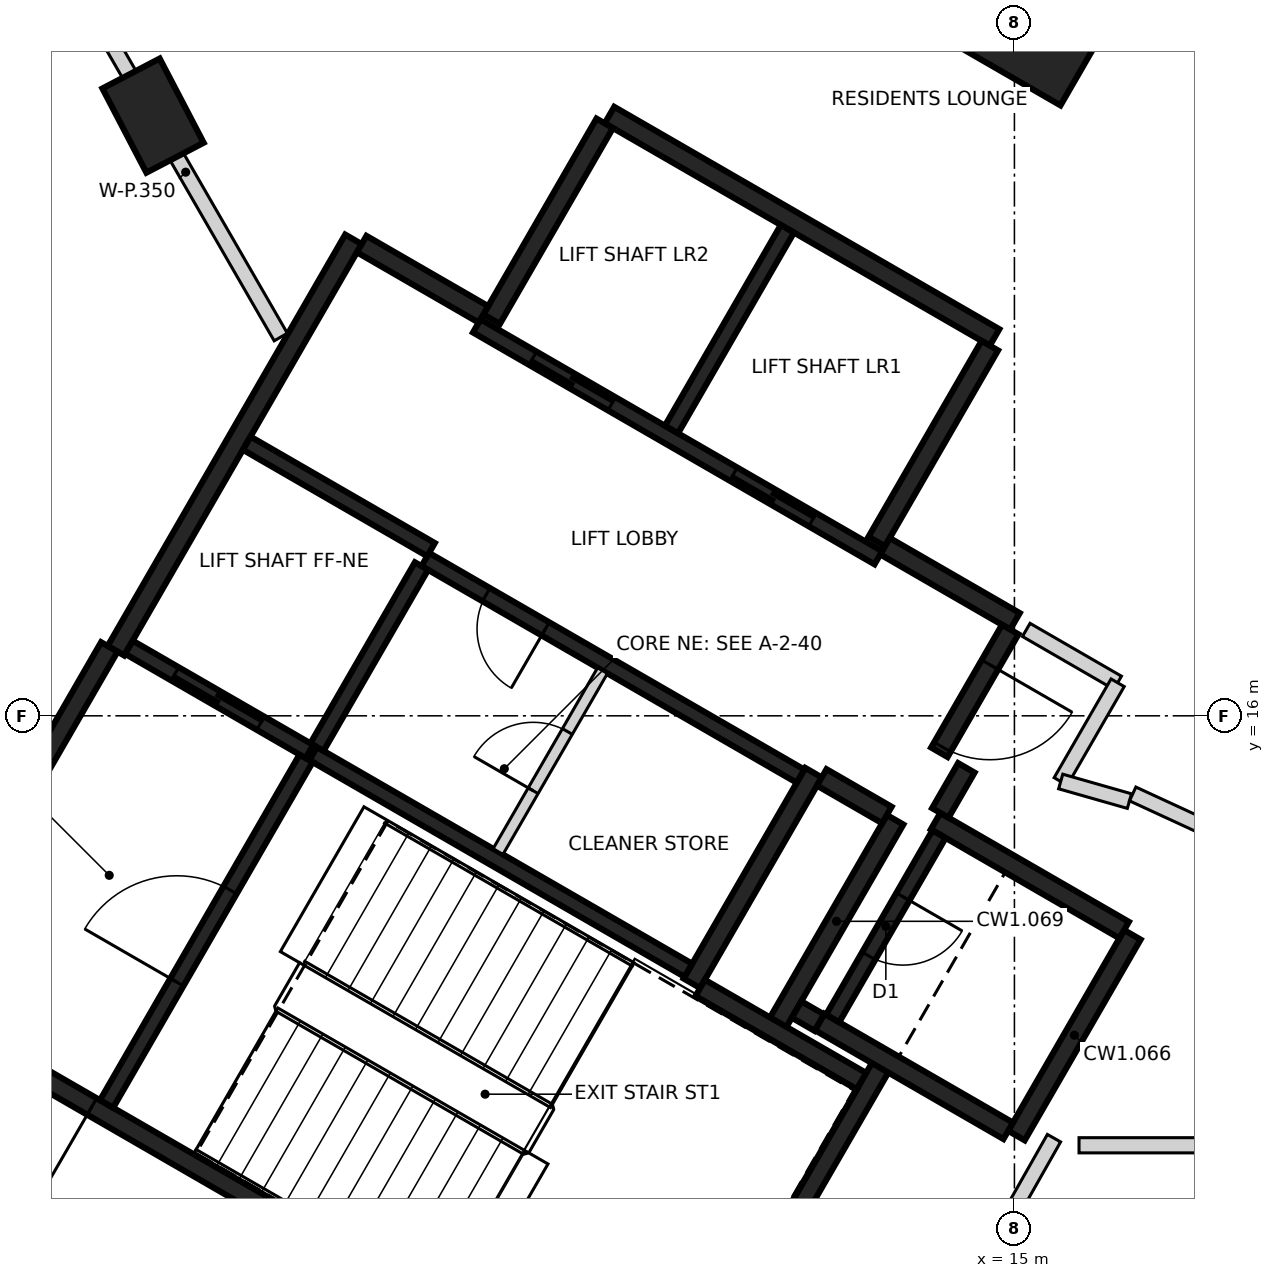
"""IFC4 building model, lengths in metres.
Left out: names, types, materials, properties, quantities, classifications, styles, units other than length and angle.
Written with IfcOpenShell. Run it as: python <this file> out.ifc"""

import sys

from ifc_helpers import new_model, si_unit, direction, frame, frame_2d, origin, origin_2d, place, context, subcontext, project, spatial, rectangle, extrude, element, fill, save


model = new_model("IFC4")
c1 = context("Model", 3, precision=1e-05, world=origin(), true_north=direction((0.0, 1.0)))
c2 = subcontext(c1, "Body", "Model", "MODEL_VIEW")
j1 = project(units=[si_unit("LENGTHUNIT", "METRE"), si_unit("PLANEANGLEUNIT", "RADIAN")], contexts=[c1])
p1 = place(None, origin())
s1 = spatial("IfcSite", under=j1, at=p1, CompositionType="ELEMENT")
p2 = place(p1, origin())
s2 = spatial("IfcBuilding", under=s1, at=p2, CompositionType="ELEMENT")
p3 = place(p2, frame((0.0, 0.0, 132.4)))
s3 = spatial("IfcBuildingStorey", under=s2, at=p3, CompositionType="ELEMENT", Elevation=132.4)
p4 = place(p3, frame((3.667, 23.896, -0.4), z_axis=(0.0, 0.0, 1.0), x_axis=(-0.463006774365, 0.886354740999, 0.0)))
e1 = element("IfcColumn", 1, at=p4, inside=s3, PredefinedType="COLUMN", context=c2, shape_type="SweptSolid", body=[
    extrude(rectangle(XDim=1.25, YDim=0.85, at=origin_2d()), origin(), (0.0, 0.0, 1.0), 3.6),
])
p5 = place(p3, frame((15.207, 26.34, -0.4), z_axis=(0.0, 0.0, 1.0), x_axis=(0.5, 0.866025403784, 0.0)))
e2 = element("IfcColumn", 2, at=p5, inside=s3, PredefinedType="COLUMN", context=c2, shape_type="SweptSolid", body=[
    extrude(rectangle(XDim=3.6, YDim=3.0, at=origin_2d()), origin(), (0.0, 0.0, 1.0), 3.6),
])
p6 = place(p3, frame((10.42, 6.498, 0.0), z_axis=(0.0, 0.0, 1.0), x_axis=(-0.866021906294, 0.500006057782, 0.0)))
e3 = element("IfcWall", 3, at=p6, inside=s3, PredefinedType="SHEAR", context=c2, shape_type="SweptSolid", body=[
    extrude(rectangle(XDim=11.55, YDim=0.25, at=frame_2d((5.775, 0.0))), origin(), (0.0, 0.0, 1.0), 3.2),
])
p7 = place(p6, frame((10.025, 0.0, 0.0)))
e4 = element("IfcOpeningElement", 4, at=p7, cuts=e3, PredefinedType="OPENING", context=c2, shape_type="SweptSolid", body=[
    extrude(rectangle(XDim=1.2, YDim=2.1, at=frame_2d((0.6, 1.05))), frame((0.0, 0.135, 0.0), z_axis=(0.0, -1.0, 0.0), x_axis=(1.0, 0.0, 0.0)), (0.0, 0.0, 1.0), 0.27),
])
p8 = place(p6, frame((8.725, 0.0, 0.0)))
e5 = element("IfcOpeningElement", 5, at=p8, cuts=e3, PredefinedType="OPENING", context=c2, shape_type="SweptSolid", body=[
    extrude(rectangle(XDim=1.2, YDim=2.1, at=frame_2d((0.6, 1.05))), frame((0.0, 0.135, 0.0), z_axis=(0.0, -1.0, 0.0), x_axis=(1.0, 0.0, 0.0)), (0.0, 0.0, 1.0), 0.27),
])
p9 = place(p3, frame((3.179, 16.856, 0.0), z_axis=(0.0, 0.0, 1.0), x_axis=(0.500004234368, 0.866022959057, 0.0)))
e6 = element("IfcWall", 6, at=p9, inside=s3, PredefinedType="SHEAR", context=c2, shape_type="SweptSolid", body=[
    extrude(rectangle(XDim=6.25, YDim=0.25, at=frame_2d((3.125, 0.0))), origin(), (0.0, 0.0, 1.0), 3.2),
])
p10 = place(p3, frame((9.673, 23.903, 0.0), z_axis=(0.0, 0.0, 1.0), x_axis=(0.86603616409, -0.499981362141, 0.0)))
e7 = element("IfcWall", 7, at=p10, inside=s3, PredefinedType="SHEAR", context=c2, shape_type="SweptSolid", body=[
    extrude(rectangle(XDim=5.85, YDim=0.25, at=frame_2d((2.925, 0.0))), origin(), (0.0, 0.0, 1.0), 3.2),
])
p11 = place(p3, frame((0.48, 12.381, 0.0), z_axis=(0.0, 0.0, 1.0), x_axis=(0.49999885962, 0.866026062182, 0.0)))
e8 = element("IfcWall", 8, at=p11, inside=s3, PredefinedType="SHEAR", context=c2, shape_type="SweptSolid", body=[
    extrude(rectangle(XDim=5.225, YDim=0.25, at=frame_2d((2.612, 0.0))), origin(), (0.0, 0.0, 1.0), 3.2),
])
p12 = place(p3, frame((13.238, 11.378, 0.0), z_axis=(0.0, 0.0, 1.0), x_axis=(-0.500008851346, -0.866020293397, 0.0)))
e9 = element("IfcWall", 9, at=p12, inside=s3, PredefinedType="SHEAR", context=c2, shape_type="SweptSolid", body=[
    extrude(rectangle(XDim=5.51, YDim=0.25, at=frame_2d((2.755, 0.0))), origin(), (0.0, 0.0, 1.0), 3.2),
])
p13 = place(p3, frame((12.357, 15.252, 0.0), z_axis=(0.0, 0.0, 1.0), x_axis=(-0.500028443584, -0.866008981251, 0.0)))
e10 = element("IfcWall", 10, at=p13, inside=s3, PredefinedType="SHEAR", context=c2, shape_type="SweptSolid", body=[
    extrude(rectangle(XDim=3.2, YDim=0.25, at=frame_2d((1.6, 0.0))), origin(), (0.0, 0.0, 1.0), 3.2),
])
for number, where, z_axis, x_axis in (
    (11, (8.123, 21.219, 0.0), (0.0, 0.0, 1.0), (0.5, 0.866, 0.0)),
    (12, (14.676, 20.87, 0.0), (0.0, 0.0, 1.0), (-0.5, -0.866, 0.0)),
):
    element("IfcWall", number, at=place(p3, frame(where, z_axis=z_axis, x_axis=x_axis)), inside=s3, PredefinedType="SHEAR", context=c2, shape_type="SweptSolid", body=[
        extrude(rectangle(XDim=2.975, YDim=0.25, at=frame_2d((1.487, 0.0))), origin(), (0.0, 0.0, 1.0), 3.2),
    ])
p14 = place(p3, frame((16.552, 13.119, 0.0), z_axis=(0.0, 0.0, 1.0), x_axis=(-0.499978833458, -0.866037623948, 0.0)))
e13 = element("IfcWall", 13, at=p14, inside=s3, PredefinedType="SHEAR", context=c2, shape_type="SweptSolid", body=[
    extrude(rectangle(XDim=3.05, YDim=0.25, at=frame_2d((1.525, 0.0))), origin(), (0.0, 0.0, 1.0), 3.2),
])
p15 = place(p3, frame((14.918, 10.54, 0.0), z_axis=(0.0, 0.0, 1.0), x_axis=(-0.866063538972, 0.499933942099, 0.0)))
e14 = element("IfcWall", 14, at=p15, inside=s3, PredefinedType="SHEAR", context=c2, shape_type="SweptSolid", body=[
    extrude(rectangle(XDim=2.865, YDim=0.25, at=frame_2d((1.432, 0.0))), origin(), (0.0, 0.0, 1.0), 3.2),
])
p16 = place(p3, frame((13.963, 14.614, 0.0), z_axis=(0.0, 0.0, 1.0), x_axis=(0.866042235819, -0.499970844928, 0.0)))
e15 = element("IfcWall", 15, at=p16, inside=s3, PredefinedType="SHEAR", context=c2, shape_type="SweptSolid", body=[
    extrude(rectangle(XDim=2.865, YDim=0.25, at=frame_2d((1.432, 0.0))), origin(), (0.0, 0.0, 1.0), 3.2),
])
p17 = place(p3, frame((11.888, 11.961, 0.0), z_axis=(0.0, 0.0, 1.0), x_axis=(0.500003324108, 0.866023484601, 0.0)))
e16 = element("IfcWall", 16, at=p17, inside=s3, PredefinedType="SHEAR", context=c2, shape_type="SweptSolid", body=[
    extrude(rectangle(XDim=3.085, YDim=0.25, at=frame_2d((1.542, 0.0))), origin(), (0.0, 0.0, 1.0), 3.2),
])
p18 = place(p3, frame((10.865, 12.418, 0.0), z_axis=(0.0, 0.0, 1.0), x_axis=(0.866026229868, -0.499998569178, 0.0)))
e17 = element("IfcWall", 17, at=p18, inside=s3, PredefinedType="SHEAR", context=c2, shape_type="SweptSolid", body=[
    extrude(rectangle(XDim=2.449, YDim=0.25, at=frame_2d((1.225, 0.0))), origin(), (0.0, 0.0, 1.0), 3.2),
])
p19 = place(p3, frame((13.297, 18.231, 0.0), z_axis=(0.0, 0.0, 1.0), x_axis=(0.866043531843, -0.499968599967, 0.0)))
e18 = element("IfcWall", 18, at=p19, inside=s3, PredefinedType="SHEAR", context=c2, shape_type="SweptSolid", body=[
    extrude(rectangle(XDim=1.975, YDim=0.25, at=frame_2d((0.987, 0.0))), origin(), (0.0, 0.0, 1.0), 3.2),
])
p20 = place(p3, frame((6.413, 22.206, 0.0), z_axis=(0.0, 0.0, 1.0), x_axis=(0.866016279763, -0.500015802937, 0.0)))
e19 = element("IfcWall", 19, at=p20, inside=s3, PredefinedType="SHEAR", context=c2, shape_type="SweptSolid", body=[
    extrude(rectangle(XDim=1.849, YDim=0.25, at=frame_2d((0.925, 0.0))), origin(), (0.0, 0.0, 1.0), 3.2),
])
p21 = place(p3, frame((14.945, 17.135, 0.0), z_axis=(0.0, 0.0, 1.0), x_axis=(-0.499983108224, -0.866035156036, 0.0)))
e20 = element("IfcWall", 20, at=p21, inside=s3, PredefinedType="SHEAR", context=c2, shape_type="SweptSolid", body=[
    extrude(rectangle(XDim=1.865, YDim=0.25, at=frame_2d((0.932, 0.0))), origin(), (0.0, 0.0, 1.0), 3.2),
])
p22 = place(p21, frame((0.535, 0.0, 0.0)))
e21 = element("IfcOpeningElement", 21, at=p22, cuts=e20, PredefinedType="OPENING", context=c2, shape_type="SweptSolid", body=[
    extrude(rectangle(XDim=1.25, YDim=2.1, at=frame_2d((0.625, 1.05))), frame((0.0, 0.135, 0.0), z_axis=(0.0, -1.0, 0.0), x_axis=(1.0, 0.0, 0.0)), (0.0, 0.0, 1.0), 0.27),
])
p23 = place(p3, frame((13.322, 14.695, 0.0), z_axis=(0.0, 0.0, 1.0), x_axis=(-0.866017078145, 0.500014420154, 0.0)))
e22 = element("IfcWall", 22, at=p23, inside=s3, PredefinedType="SHEAR", context=c2, shape_type="SweptSolid", body=[
    extrude(rectangle(XDim=0.989, YDim=0.25, at=frame_2d((0.495, 0.0))), origin(), (0.0, 0.0, 1.0), 3.2),
])
p24 = place(p3, frame((14.368, 15.315, 0.0), z_axis=(0.0, 0.0, 1.0), x_axis=(-0.499897359611, -0.866084655132, 0.0)))
e23 = element("IfcWall", 23, at=p24, inside=s3, PredefinedType="SHEAR", context=c2, shape_type="SweptSolid", body=[
    extrude(rectangle(XDim=0.685, YDim=0.25, at=frame_2d((0.342, 0.0))), origin(), (0.0, 0.0, 1.0), 3.2),
])
p25 = place(p3, frame((12.433, 11.964, 0.0), z_axis=(0.0, 0.0, 1.0), x_axis=(-0.866055875208, 0.499947218231, 0.0)))
e24 = element("IfcWall", 24, at=p25, inside=s3, PredefinedType="SHEAR", context=c2, shape_type="SweptSolid", body=[
    extrude(rectangle(XDim=0.345, YDim=0.25, at=frame_2d((0.172, 0.0))), origin(), (0.0, 0.0, 1.0), 3.2),
])
p26 = place(p3, frame((13.21, 18.08, 0.0), z_axis=(0.0, 0.0, 1.0), x_axis=(-0.866030299012, 0.499991521122, 0.0)))
e25 = element("IfcWall", 25, at=p26, inside=s3, PredefinedType="SHEAR", context=c2, shape_type="SweptSolid", body=[
    extrude(rectangle(XDim=6.1, YDim=0.2, at=frame_2d((3.05, 0.0))), origin(), (0.0, 0.0, 1.0), 3.2),
])
p27 = place(p26, frame((1.0, 0.0, 0.0)))
e26 = element("IfcOpeningElement", 26, at=p27, cuts=e25, PredefinedType="OPENING", context=c2, shape_type="SweptSolid", body=[
    extrude(rectangle(XDim=1.2, YDim=2.1, at=frame_2d((0.6, 1.05))), frame((0.0, 0.11, 0.0), z_axis=(0.0, -1.0, 0.0), x_axis=(1.0, 0.0, 0.0)), (0.0, 0.0, 1.0), 0.22),
])
p28 = place(p26, frame((4.05, 0.0, 0.0)))
e27 = element("IfcOpeningElement", 27, at=p28, cuts=e25, PredefinedType="OPENING", context=c2, shape_type="SweptSolid", body=[
    extrude(rectangle(XDim=1.2, YDim=2.1, at=frame_2d((0.6, 1.05))), frame((0.0, 0.11, 0.0), z_axis=(0.0, -1.0, 0.0), x_axis=(1.0, 0.0, 0.0)), (0.0, 0.0, 1.0), 0.22),
])
p29 = place(p3, frame((5.775, 15.502, 0.0), z_axis=(0.0, 0.0, 1.0), x_axis=(0.866020080793, -0.500009219579, 0.0)))
e28 = element("IfcWall", 28, at=p29, inside=s3, PredefinedType="SHEAR", context=c2, shape_type="SweptSolid", body=[
    extrude(rectangle(XDim=5.699, YDim=0.2, at=frame_2d((2.85, 0.0))), origin(), (0.0, 0.0, 1.0), 3.2),
])
p30 = place(p3, frame((12.185, 15.207, 0.0), z_axis=(0.0, 0.0, 1.0), x_axis=(-0.866020080793, 0.500009219579, 0.0)))
e29 = element("IfcWall", 29, at=p30, inside=s3, PredefinedType="SHEAR", context=c2, shape_type="SweptSolid", body=[
    extrude(rectangle(XDim=5.699, YDim=0.2, at=frame_2d((2.85, 0.0))), origin(), (0.0, 0.0, 1.0), 3.2),
])
p31 = place(p30, frame((3.874, 0.0, 0.0)))
e30 = element("IfcOpeningElement", 30, at=p31, cuts=e29, PredefinedType="OPENING", context=c2, shape_type="SweptSolid", body=[
    extrude(rectangle(XDim=0.9, YDim=2.1, at=frame_2d((0.45, 1.05))), frame((0.0, 0.11, 0.0), z_axis=(0.0, -1.0, 0.0), x_axis=(1.0, 0.0, 0.0)), (0.0, 0.0, 1.0), 0.22),
])
p32 = place(p3, frame((3.057, 10.895, 0.0), z_axis=(0.0, 0.0, 1.0), x_axis=(0.499989418164, 0.866031513124, 0.0)))
e31 = element("IfcWall", 31, at=p32, inside=s3, PredefinedType="SHEAR", context=c2, shape_type="SweptSolid", body=[
    extrude(rectangle(XDim=5.251, YDim=0.2, at=frame_2d((2.625, 0.0))), origin(), (0.0, 0.0, 1.0), 3.2),
])
p33 = place(p32, frame((1.849, 0.0, 0.0)))
e32 = element("IfcOpeningElement", 32, at=p33, cuts=e31, PredefinedType="OPENING", context=c2, shape_type="SweptSolid", body=[
    extrude(rectangle(XDim=1.4, YDim=2.1, at=frame_2d((0.7, 1.05))), frame((0.0, 0.11, 0.0), z_axis=(0.0, -1.0, 0.0), x_axis=(1.0, 0.0, 0.0)), (0.0, 0.0, 1.0), 0.22),
])
p34 = place(p3, frame((10.489, 19.767, 0.0), z_axis=(0.0, 0.0, 1.0), x_axis=(0.499946628782, 0.866056215479, 0.0)))
e33 = element("IfcWall", 33, at=p34, inside=s3, PredefinedType="SHEAR", context=c2, shape_type="SweptSolid", body=[
    extrude(rectangle(XDim=3.048, YDim=0.2, at=frame_2d((1.524, 0.0))), origin(), (0.0, 0.0, 1.0), 3.2),
])
p35 = place(p3, frame((14.008, 14.442, 0.0), z_axis=(0.0, 0.0, 1.0), x_axis=(-0.499986818241, -0.866033014143, 0.0)))
e34 = element("IfcWall", 34, at=p35, inside=s3, PredefinedType="SHEAR", context=c2, shape_type="SweptSolid", body=[
    extrude(rectangle(XDim=2.798, YDim=0.2, at=frame_2d((1.399, 0.0))), origin(), (0.0, 0.0, 1.0), 3.2),
])
p36 = place(p35, frame((0.949, 0.0, 0.0)))
e35 = element("IfcOpeningElement", 35, at=p36, cuts=e34, PredefinedType="OPENING", context=c2, shape_type="SweptSolid", body=[
    extrude(rectangle(XDim=0.9, YDim=2.1, at=frame_2d((0.45, 1.05))), frame((0.0, 0.11, 0.0), z_axis=(0.0, -1.0, 0.0), x_axis=(1.0, 0.0, 0.0)), (0.0, 0.0, 1.0), 0.22),
])
p37 = place(p3, frame((7.199, 17.97, 0.0), z_axis=(0.0, 0.0, 1.0), x_axis=(-0.499968400327, -0.866043647095, 0.0)))
e36 = element("IfcWall", 36, at=p37, inside=s3, PredefinedType="SHEAR", context=c2, shape_type="SweptSolid", body=[
    extrude(rectangle(XDim=2.75, YDim=0.2, at=frame_2d((1.375, 0.0))), origin(), (0.0, 0.0, 1.0), 3.2),
])
p38 = place(p3, frame((5.725, 15.531, 0.0), z_axis=(0.0, 0.0, 1.0), x_axis=(-0.866037306777, 0.499979382845, 0.0)))
e37 = element("IfcWall", 37, at=p38, inside=s3, PredefinedType="SHEAR", context=c2, shape_type="SweptSolid", body=[
    extrude(rectangle(XDim=2.742, YDim=0.2, at=frame_2d((1.371, 0.0))), origin(), (0.0, 0.0, 1.0), 3.2),
])
p39 = place(p38, frame((0.743, 0.0, 0.0)))
e38 = element("IfcOpeningElement", 38, at=p39, cuts=e37, PredefinedType="OPENING", context=c2, shape_type="SweptSolid", body=[
    extrude(rectangle(XDim=1.3, YDim=2.1, at=frame_2d((0.65, 1.05))), frame((0.0, 0.11, 0.0), z_axis=(0.0, -1.0, 0.0), x_axis=(1.0, 0.0, 0.0)), (0.0, 0.0, 1.0), 0.22),
])
p40 = place(p3, frame((4.901, 19.586, 0.0), z_axis=(0.0, 0.0, 1.0), x_axis=(0.866022890907, -0.500004352405, 0.0)))
e39 = element("IfcWall", 39, at=p40, inside=s3, PredefinedType="SHEAR", context=c2, shape_type="SweptSolid", body=[
    extrude(rectangle(XDim=2.799, YDim=0.2, at=frame_2d((1.399, 0.0))), origin(), (0.0, 0.0, 1.0), 3.2),
])
p41 = place(p3, frame((8.207, 14.214, 0.0), z_axis=(0.0, 0.0, 1.0), x_axis=(0.499922376475, 0.866070215109, 0.0)))
e40 = element("IfcWall", 40, at=p41, inside=s3, PredefinedType="PARTITIONING", context=c2, shape_type="SweptSolid", body=[
    extrude(rectangle(XDim=2.749, YDim=0.15, at=frame_2d((1.374, 0.0))), origin(), (0.0, 0.0, 1.0), 3.2),
])
p42 = place(p41, frame((0.924, 0.0, 0.0)))
e41 = element("IfcOpeningElement", 41, at=p42, cuts=e40, PredefinedType="OPENING", context=c2, shape_type="SweptSolid", body=[
    extrude(rectangle(XDim=0.9, YDim=2.1, at=frame_2d((0.45, 1.05))), frame((0.0, 0.085, 0.0), z_axis=(0.0, -1.0, 0.0), x_axis=(1.0, 0.0, 0.0)), (0.0, 0.0, 1.0), 0.17),
])
p43 = place(p3, frame((14.066, 7.876, 0.0), z_axis=(0.0, 0.0, 1.0), x_axis=(0.492812174249, 0.870135714077, 0.0)))
e42 = element("IfcWall", 42, at=p43, inside=s3, PredefinedType="PARTITIONING", context=c2, shape_type="SweptSolid", body=[
    extrude(rectangle(XDim=2.951, YDim=0.2, at=frame_2d((1.476, 0.0))), origin(), (0.0, 0.0, 1.0), 3.2),
])
p44 = place(p3, frame((15.156, 17.13, 0.0), z_axis=(0.0, 0.0, 1.0), x_axis=(0.865755062894, -0.500467952093, 0.0)))
e43 = element("IfcWall", 43, at=p44, inside=s3, PredefinedType="PARTITIONING", context=c2, shape_type="SweptSolid", body=[
    extrude(rectangle(XDim=1.389, YDim=0.2, at=frame_2d((0.694, 0.0))), origin(), (0.0, 0.0, 1.0), 3.2),
])
p45 = place(p3, frame((15.609, 15.136, 0.0), z_axis=(0.0, 0.0, 1.0), x_axis=(0.499501622561, 0.866312950993, 0.0)))
e44 = element("IfcWall", 44, at=p45, inside=s3, PredefinedType="PARTITIONING", context=c2, shape_type="SweptSolid", body=[
    extrude(rectangle(XDim=1.5, YDim=0.2, at=frame_2d((0.75, 0.0))), origin(), (0.0, 0.0, 1.0), 3.2),
])
p46 = place(p3, frame((15.609, 15.136, 0.0), z_axis=(0.0, 0.0, 1.0), x_axis=(0.961592512205, -0.274481038455, 0.0)))
e45 = element("IfcWall", 45, at=p46, inside=s3, PredefinedType="PARTITIONING", context=c2, shape_type="SweptSolid", body=[
    extrude(rectangle(XDim=0.94, YDim=0.2, at=frame_2d((0.47, 0.0))), origin(), (0.0, 0.0, 1.0), 3.2),
])
p47 = place(p3, frame((15.85, 10.35, 0.0), z_axis=(0.0, 0.0, 1.0), x_axis=(1.0, 0.0, 0.0)))
e46 = element("IfcWall", 46, at=p47, inside=s3, PredefinedType="PARTITIONING", context=c2, shape_type="SweptSolid", body=[
    extrude(rectangle(XDim=2.5, YDim=0.2, at=frame_2d((1.25, 0.0))), origin(), (0.0, 0.0, 1.0), 3.2),
])
p48 = place(p3, frame((16.556, 14.972, 0.0), z_axis=(0.0, 0.0, 1.0), x_axis=(0.907999158806, -0.418971989048, 0.0)))
e47 = element("IfcWall", 47, at=p48, inside=s3, PredefinedType="PARTITIONING", context=c2, shape_type="SweptSolid", body=[
    extrude(rectangle(XDim=1.976, YDim=0.2, at=frame_2d((0.988, 0.0))), origin(), (0.0, 0.0, 1.0), 3.2),
])
p49 = place(p3, frame((2.845, 25.321, 0.0), z_axis=(0.0, 0.0, 1.0), x_axis=(0.499730893997, -0.86618071647, 0.0)))
e48 = element("IfcWall", 48, at=p49, inside=s3, PredefinedType="PARTITIONING", context=c2, shape_type="SweptSolid", body=[
    extrude(rectangle(XDim=5.008, YDim=0.2, at=frame_2d((2.504, 0.0))), origin(), (0.0, 0.0, 1.0), 3.2),
])
p50 = place(p39, origin())
e49 = element("IfcDoor", 49, at=p50, inside=s3, OperationType="SLIDING_TO_RIGHT", PredefinedType="DOOR", context=c2, shape_type="SweptSolid", body=[
    extrude(rectangle(XDim=1.3, YDim=2.1, at=frame_2d((0.65, 1.05))), frame((0.0, 0.025, 0.0), z_axis=(0.0, -1.0, 0.0), x_axis=(1.0, 0.0, 0.0)), (0.0, 0.0, 1.0), 0.05),
])
fill(e38, e49)
p51 = place(p27, origin())
e50 = element("IfcDoor", 50, at=p51, inside=s3, OperationType="DOUBLE_DOOR_SLIDING", PredefinedType="DOOR", context=c2, shape_type="SweptSolid", body=[
    extrude(rectangle(XDim=1.2, YDim=2.1, at=frame_2d((0.6, 1.05))), frame((0.0, 0.025, 0.0), z_axis=(0.0, -1.0, 0.0), x_axis=(1.0, 0.0, 0.0)), (0.0, 0.0, 1.0), 0.05),
])
fill(e26, e50)
p52 = place(p28, origin())
e51 = element("IfcDoor", 51, at=p52, inside=s3, OperationType="DOUBLE_DOOR_SLIDING", PredefinedType="DOOR", context=c2, shape_type="SweptSolid", body=[
    extrude(rectangle(XDim=1.2, YDim=2.1, at=frame_2d((0.6, 1.05))), frame((0.0, 0.025, 0.0), z_axis=(0.0, -1.0, 0.0), x_axis=(1.0, 0.0, 0.0)), (0.0, 0.0, 1.0), 0.05),
])
fill(e27, e51)
p53 = place(p22, origin())
e52 = element("IfcDoor", 52, at=p53, inside=s3, OperationType="SINGLE_SWING_LEFT", PredefinedType="DOOR", context=c2, shape_type="SweptSolid", body=[
    extrude(rectangle(XDim=1.25, YDim=2.1, at=frame_2d((0.625, 1.05))), frame((0.0, 0.025, 0.0), z_axis=(0.0, -1.0, 0.0), x_axis=(1.0, 0.0, 0.0)), (0.0, 0.0, 1.0), 0.05),
])
fill(e21, e52)
p54 = place(p8, origin())
e53 = element("IfcDoor", 53, at=p54, inside=s3, OperationType="SINGLE_SWING_RIGHT", PredefinedType="DOOR", context=c2, shape_type="SweptSolid", body=[
    extrude(rectangle(XDim=1.2, YDim=2.1, at=frame_2d((0.6, 1.05))), frame((0.0, 0.025, 0.0), z_axis=(0.0, -1.0, 0.0), x_axis=(1.0, 0.0, 0.0)), (0.0, 0.0, 1.0), 0.05),
])
fill(e5, e53)
p55 = place(p33, origin())
e54 = element("IfcDoor", 54, at=p55, inside=s3, OperationType="SINGLE_SWING_RIGHT", PredefinedType="DOOR", context=c2, shape_type="SweptSolid", body=[
    extrude(rectangle(XDim=1.4, YDim=2.1, at=frame_2d((0.7, 1.05))), frame((0.0, 0.025, 0.0), z_axis=(0.0, -1.0, 0.0), x_axis=(1.0, 0.0, 0.0)), (0.0, 0.0, 1.0), 0.05),
])
fill(e32, e54)
p56 = place(p31, origin())
e55 = element("IfcDoor", 55, at=p56, inside=s3, OperationType="SINGLE_SWING_LEFT", PredefinedType="DOOR", context=c2, shape_type="SweptSolid", body=[
    extrude(rectangle(XDim=0.9, YDim=2.1, at=frame_2d((0.45, 1.05))), frame((0.0, 0.025, 0.0), z_axis=(0.0, -1.0, 0.0), x_axis=(1.0, 0.0, 0.0)), (0.0, 0.0, 1.0), 0.05),
])
fill(e30, e55)
p57 = place(p36, origin())
e56 = element("IfcDoor", 56, at=p57, inside=s3, OperationType="SINGLE_SWING_RIGHT", PredefinedType="DOOR", context=c2, shape_type="SweptSolid", body=[
    extrude(rectangle(XDim=0.9, YDim=2.1, at=frame_2d((0.45, 1.05))), frame((0.0, 0.025, 0.0), z_axis=(0.0, -1.0, 0.0), x_axis=(1.0, 0.0, 0.0)), (0.0, 0.0, 1.0), 0.05),
])
fill(e35, e56)
p58 = place(p42, origin())
e57 = element("IfcDoor", 57, at=p58, inside=s3, OperationType="SINGLE_SWING_LEFT", PredefinedType="DOOR", context=c2, shape_type="SweptSolid", body=[
    extrude(rectangle(XDim=0.9, YDim=2.1, at=frame_2d((0.45, 1.05))), frame((0.0, 0.025, 0.0), z_axis=(0.0, -1.0, 0.0), x_axis=(1.0, 0.0, 0.0)), (0.0, 0.0, 1.0), 0.05),
])
fill(e41, e57)
save(model, sys.argv[1])
